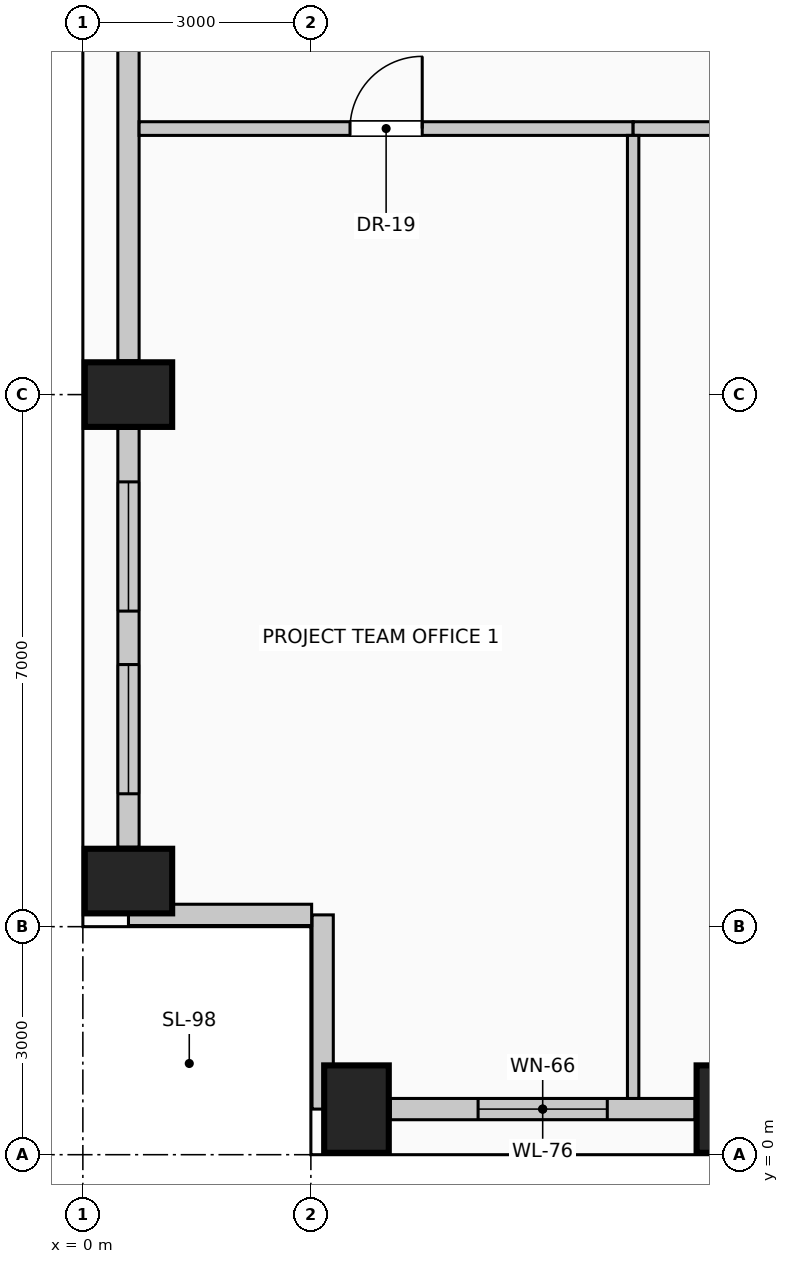
"""IFC4 building model, lengths in metres.
Left out: names, types, materials, properties, quantities, classifications, styles, units other than length and angle.
Written with IfcOpenShell. Run it as: python <this file> out.ifc"""

import sys

from ifc_helpers import new_model, si_unit, direction, frame, frame_2d, origin, origin_2d, place, context, subcontext, project, spatial, rectangle, extrude, element, fill, save


model = new_model("IFC4")
c1 = context("Model", 3, precision=1e-05, world=origin(), true_north=direction((0.0, 1.0)))
c2 = subcontext(c1, "Body", "Model", "MODEL_VIEW")
j1 = project(units=[si_unit("LENGTHUNIT", "METRE"), si_unit("PLANEANGLEUNIT", "RADIAN")], contexts=[c1])
p1 = place(None, origin())
s1 = spatial("IfcSite", under=j1, at=p1, CompositionType="ELEMENT")
p2 = place(p1, origin())
s2 = spatial("IfcBuilding", under=s1, at=p2, CompositionType="ELEMENT")
p3 = place(p2, frame((0.0, 0.0, 152.6)))
s3 = spatial("IfcBuildingStorey", under=s2, at=p3, CompositionType="ELEMENT", Elevation=152.6)
for number, where, z_axis, x_axis in (
    (1, (3.6, 0.6, 0.0), (0.0, 0.0, 1.0), (1.0, 0.0, 0.0)),
    (2, (8.5, 0.6, 0.0), (0.0, 0.0, 1.0), (1.0, 0.0, 0.0)),
    (3, (0.6, 3.6, 0.0), (0.0, 0.0, 1.0), (0.0, 1.0, 0.0)),
    (4, (0.6, 10.0, 0.0), (0.0, 0.0, 1.0), (0.0, 1.0, 0.0)),
):
    element("IfcColumn", number, at=place(p3, frame(where, z_axis=z_axis, x_axis=x_axis)), inside=s3, PredefinedType="COLUMN", context=c2, shape_type="SweptSolid", body=[
        extrude(rectangle(XDim=0.85, YDim=1.15, at=origin_2d()), origin(), (0.0, 0.0, 1.0), 4.0),
    ])
p4 = place(p3, frame((8.055, 0.6, 0.0), z_axis=(0.0, 0.0, 1.0), x_axis=(-1.0, 0.0, 0.0)))
e5 = element("IfcWall", 5, at=p4, inside=s3, PredefinedType="SOLIDWALL", context=c2, shape_type="SweptSolid", body=[
    extrude(rectangle(XDim=4.01, YDim=0.28, at=frame_2d((2.005, 0.0))), origin(), (0.0, 0.0, 1.0), 2.875),
])
p5 = place(p4, frame((1.155, 0.0, 0.5)))
e6 = element("IfcOpeningElement", 6, at=p5, cuts=e5, PredefinedType="OPENING", context=c2, shape_type="SweptSolid", body=[
    extrude(rectangle(XDim=1.7, YDim=1.95, at=frame_2d((0.85, 0.975))), frame((0.0, 0.15, 0.0), z_axis=(0.0, -1.0, 0.0), x_axis=(1.0, 0.0, 0.0)), (0.0, 0.0, 1.0), 0.3),
])
p6 = place(p3, frame((0.6, 4.045, 0.0), z_axis=(0.0, 0.0, 1.0), x_axis=(0.0, 1.0, 0.0)))
e7 = element("IfcWall", 7, at=p6, inside=s3, PredefinedType="SOLIDWALL", context=c2, shape_type="SweptSolid", body=[
    extrude(rectangle(XDim=5.51, YDim=0.28, at=frame_2d((2.755, 0.0))), origin(), (0.0, 0.0, 1.0), 2.875),
])
p7 = place(p6, frame((0.703, 0.0, 0.5)))
e8 = element("IfcOpeningElement", 8, at=p7, cuts=e7, PredefinedType="OPENING", context=c2, shape_type="SweptSolid", body=[
    extrude(rectangle(XDim=1.7, YDim=1.95, at=frame_2d((0.85, 0.975))), frame((0.0, 0.15, 0.0), z_axis=(0.0, -1.0, 0.0), x_axis=(1.0, 0.0, 0.0)), (0.0, 0.0, 1.0), 0.3),
])
p8 = place(p6, frame((3.107, 0.0, 0.5)))
e9 = element("IfcOpeningElement", 9, at=p8, cuts=e7, PredefinedType="OPENING", context=c2, shape_type="SweptSolid", body=[
    extrude(rectangle(XDim=1.7, YDim=1.95, at=frame_2d((0.85, 0.975))), frame((0.0, 0.15, 0.0), z_axis=(0.0, -1.0, 0.0), x_axis=(1.0, 0.0, 0.0)), (0.0, 0.0, 1.0), 0.3),
])
p9 = place(p3, frame((0.6, 10.445, 0.0), z_axis=(0.0, 0.0, 1.0), x_axis=(0.0, 1.0, 0.0)))
e10 = element("IfcWall", 10, at=p9, inside=s3, PredefinedType="SOLIDWALL", context=c2, shape_type="SweptSolid", body=[
    extrude(rectangle(XDim=7.11, YDim=0.28, at=frame_2d((3.555, 0.0))), origin(), (0.0, 0.0, 1.0), 2.875),
])
p10 = place(p3, frame((3.155, 0.6, 0.0), z_axis=(0.0, 0.0, 1.0), x_axis=(0.0, 1.0, 0.0)))
e11 = element("IfcWall", 11, at=p10, inside=s3, PredefinedType="SOLIDWALL", context=c2, shape_type="SweptSolid", body=[
    extrude(rectangle(XDim=2.555, YDim=0.28, at=frame_2d((1.277, 0.0))), origin(), (0.0, 0.0, 1.0), 3.725),
])
p11 = place(p3, frame((3.01, 3.155, 0.0), z_axis=(0.0, 0.0, 1.0), x_axis=(-1.0, 0.0, 0.0)))
e12 = element("IfcWall", 12, at=p11, inside=s3, PredefinedType="SOLIDWALL", context=c2, shape_type="SweptSolid", body=[
    extrude(rectangle(XDim=2.41, YDim=0.28, at=frame_2d((1.205, 0.0))), origin(), (0.0, 0.0, 1.0), 3.725),
])
p12 = place(p3, frame((0.74, 13.5, 0.0), z_axis=(0.0, 0.0, 1.0), x_axis=(1.0, 0.0, 0.0)))
e13 = element("IfcWall", 13, at=p12, inside=s3, PredefinedType="PARTITIONING", context=c2, shape_type="SweptSolid", body=[
    extrude(rectangle(XDim=6.5, YDim=0.18, at=frame_2d((3.25, 0.0))), origin(), (0.0, 0.0, 1.0), 3.725),
])
p13 = place(p12, frame((2.775, 0.0, 0.0)))
e14 = element("IfcOpeningElement", 14, at=p13, cuts=e13, PredefinedType="OPENING", context=c2, shape_type="SweptSolid", body=[
    extrude(rectangle(XDim=0.95, YDim=2.15, at=frame_2d((0.475, 1.075))), frame((0.0, 0.1, 0.0), z_axis=(0.0, -1.0, 0.0), x_axis=(1.0, 0.0, 0.0)), (0.0, 0.0, 1.0), 0.2),
])
p14 = place(p3, frame((7.24, 13.5, 0.0), z_axis=(0.0, 0.0, 1.0), x_axis=(1.0, 0.0, 0.0)))
e15 = element("IfcWall", 15, at=p14, inside=s3, PredefinedType="PARTITIONING", context=c2, shape_type="SweptSolid", body=[
    extrude(rectangle(XDim=5.6, YDim=0.18, at=frame_2d((2.8, 0.0))), origin(), (0.0, 0.0, 1.0), 3.725),
])
p15 = place(p14, frame((2.275, 0.0, 0.0)))
e16 = element("IfcOpeningElement", 16, at=p15, cuts=e15, PredefinedType="OPENING", context=c2, shape_type="SweptSolid", body=[
    extrude(rectangle(XDim=1.05, YDim=2.15, at=frame_2d((0.525, 1.075))), frame((0.0, 0.1, 0.0), z_axis=(0.0, -1.0, 0.0), x_axis=(1.0, 0.0, 0.0)), (0.0, 0.0, 1.0), 0.2),
])
p16 = place(p3, frame((7.24, 0.74, 0.0), z_axis=(0.0, 0.0, 1.0), x_axis=(0.0, 1.0, 0.0)))
e17 = element("IfcWall", 17, at=p16, inside=s3, PredefinedType="PARTITIONING", context=c2, shape_type="SweptSolid", body=[
    extrude(rectangle(XDim=12.67, YDim=0.15, at=frame_2d((6.335, 0.0))), origin(), (0.0, 0.0, 1.0), 3.725),
])
p17 = place(p5, origin())
e18 = element("IfcWindow", 18, at=p17, inside=s3, PartitioningType="SINGLE_PANEL", PredefinedType="WINDOW", context=c2, shape_type="SweptSolid", body=[
    extrude(rectangle(XDim=1.7, YDim=1.95, at=frame_2d((0.85, 0.975))), frame((0.0, 0.03, 0.0), z_axis=(0.0, -1.0, 0.0), x_axis=(1.0, 0.0, 0.0)), (0.0, 0.0, 1.0), 0.06),
])
fill(e6, e18)
p18 = place(p7, origin())
e19 = element("IfcWindow", 19, at=p18, inside=s3, PartitioningType="SINGLE_PANEL", PredefinedType="WINDOW", context=c2, shape_type="SweptSolid", body=[
    extrude(rectangle(XDim=1.7, YDim=1.95, at=frame_2d((0.85, 0.975))), frame((0.0, 0.03, 0.0), z_axis=(0.0, -1.0, 0.0), x_axis=(1.0, 0.0, 0.0)), (0.0, 0.0, 1.0), 0.06),
])
fill(e8, e19)
p19 = place(p8, origin())
e20 = element("IfcWindow", 20, at=p19, inside=s3, PartitioningType="SINGLE_PANEL", PredefinedType="WINDOW", context=c2, shape_type="SweptSolid", body=[
    extrude(rectangle(XDim=1.7, YDim=1.95, at=frame_2d((0.85, 0.975))), frame((0.0, 0.03, 0.0), z_axis=(0.0, -1.0, 0.0), x_axis=(1.0, 0.0, 0.0)), (0.0, 0.0, 1.0), 0.06),
])
fill(e9, e20)
p20 = place(p13, origin())
e21 = element("IfcDoor", 21, at=p20, inside=s3, OperationType="SINGLE_SWING_RIGHT", PredefinedType="DOOR", context=c2, shape_type="SweptSolid", body=[
    extrude(rectangle(XDim=0.95, YDim=2.15, at=frame_2d((0.475, 1.075))), frame((0.0, 0.025, 0.0), z_axis=(0.0, -1.0, 0.0), x_axis=(1.0, 0.0, 0.0)), (0.0, 0.0, 1.0), 0.05),
])
fill(e14, e21)
save(model, sys.argv[1])
